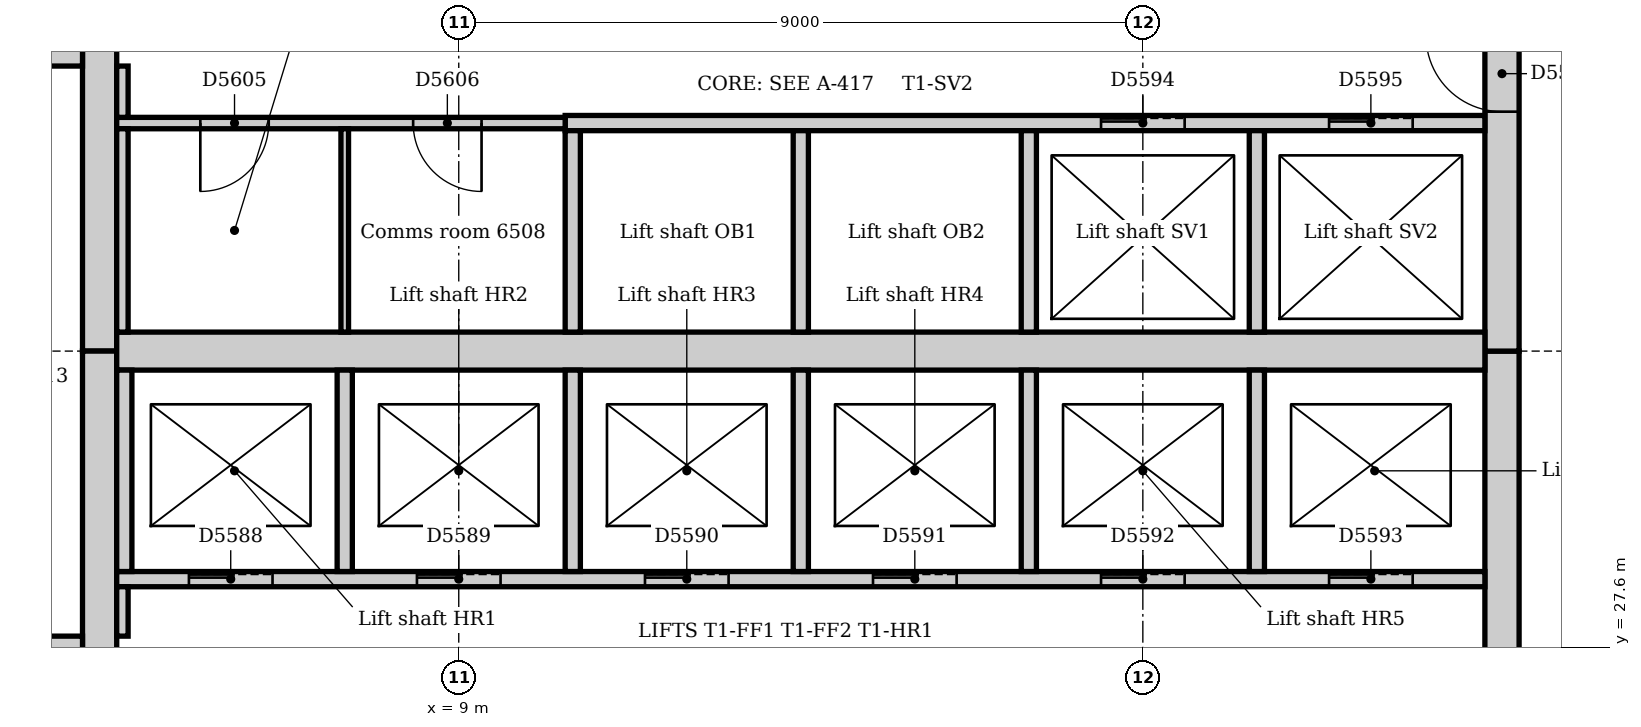
"""IFC4 building model, lengths in metres.
Left out: names, types, materials, properties, quantities, classifications, styles, units other than length and angle.
Written with IfcOpenShell. Run it as: python <this file> out.ifc"""

import sys

from ifc_helpers import new_model, si_unit, direction, frame, frame_2d, origin, place, context, subcontext, project, spatial, rectangle, extrude, element, fill, save


model = new_model("IFC4")
c1 = context("Model", 3, precision=1e-05, world=origin(), true_north=direction((0.0, 1.0)))
c2 = subcontext(c1, "Body", "Model", "MODEL_VIEW")
j1 = project(units=[si_unit("LENGTHUNIT", "METRE"), si_unit("PLANEANGLEUNIT", "RADIAN")], contexts=[c1])
p1 = place(None, origin())
s1 = spatial("IfcSite", under=j1, at=p1, CompositionType="ELEMENT")
p2 = place(p1, origin())
s2 = spatial("IfcBuilding", under=s1, at=p2, CompositionType="ELEMENT")
p3 = place(p2, frame((0.0, 0.0, 271.0)))
s3 = spatial("IfcBuildingStorey", under=s2, at=p3, CompositionType="ELEMENT", Elevation=271.0)
p4 = place(p3, frame((22.725, 21.0, 0.0), z_axis=(0.0, 0.0, 1.0), x_axis=(0.0, 1.0, 0.0)))
e1 = element("IfcWall", 1, at=p4, inside=s3, PredefinedType="SOLIDWALL", context=c2, shape_type="SweptSolid", body=[
    extrude(rectangle(XDim=10.5, YDim=0.45, at=frame_2d((5.25, 0.0))), origin(), (0.0, 0.0, 1.0), 4.0),
])
p5 = place(p4, frame((4.35, 0.0, 0.0)))
e2 = element("IfcOpeningElement", 2, at=p5, cuts=e1, PredefinedType="OPENING", context=c2, shape_type="SweptSolid", body=[
    extrude(rectangle(XDim=1.8, YDim=2.1, at=frame_2d((0.9, 1.05))), frame((0.0, 0.235, 0.0), z_axis=(0.0, -1.0, 0.0), x_axis=(1.0, 0.0, 0.0)), (0.0, 0.0, 1.0), 0.47),
])
p6 = place(p3, frame((22.725, 31.5, 0.0), z_axis=(0.0, 0.0, 1.0), x_axis=(0.0, 1.0, 0.0)))
e3 = element("IfcWall", 3, at=p6, inside=s3, PredefinedType="SOLIDWALL", context=c2, shape_type="SweptSolid", body=[
    extrude(rectangle(XDim=10.5, YDim=0.45, at=frame_2d((5.25, 0.0))), origin(), (0.0, 0.0, 1.0), 4.0),
])
p7 = place(p6, frame((3.15, 0.0, 0.0)))
e4 = element("IfcOpeningElement", 4, at=p7, cuts=e3, PredefinedType="OPENING", context=c2, shape_type="SweptSolid", body=[
    extrude(rectangle(XDim=1.0, YDim=2.1, at=frame_2d((0.5, 1.05))), frame((0.0, 0.235, 0.0), z_axis=(0.0, -1.0, 0.0), x_axis=(1.0, 0.0, 0.0)), (0.0, 0.0, 1.0), 0.47),
])
p8 = place(p6, frame((5.2, 0.0, 0.0)))
e5 = element("IfcOpeningElement", 5, at=p8, cuts=e3, PredefinedType="OPENING", context=c2, shape_type="SweptSolid", body=[
    extrude(rectangle(XDim=1.0, YDim=2.1, at=frame_2d((0.5, 1.05))), frame((0.0, 0.235, 0.0), z_axis=(0.0, -1.0, 0.0), x_axis=(1.0, 0.0, 0.0)), (0.0, 0.0, 1.0), 0.47),
])
p9 = place(p3, frame((4.275, 42.0, 0.0), z_axis=(0.0, 0.0, 1.0), x_axis=(0.0, -1.0, 0.0)))
e6 = element("IfcWall", 6, at=p9, inside=s3, PredefinedType="SOLIDWALL", context=c2, shape_type="SweptSolid", body=[
    extrude(rectangle(XDim=10.5, YDim=0.45, at=frame_2d((5.25, 0.0))), origin(), (0.0, 0.0, 1.0), 4.0),
])
p10 = place(p9, frame((5.3, 0.0, 0.0)))
e7 = element("IfcOpeningElement", 7, at=p10, cuts=e6, PredefinedType="OPENING", context=c2, shape_type="SweptSolid", body=[
    extrude(rectangle(XDim=1.0, YDim=2.1, at=frame_2d((0.5, 1.05))), frame((0.0, 0.235, 0.0), z_axis=(0.0, -1.0, 0.0), x_axis=(1.0, 0.0, 0.0)), (0.0, 0.0, 1.0), 0.47),
])
p11 = place(p3, frame((4.275, 31.5, 0.0), z_axis=(0.0, 0.0, 1.0), x_axis=(0.0, -1.0, 0.0)))
e8 = element("IfcWall", 8, at=p11, inside=s3, PredefinedType="SOLIDWALL", context=c2, shape_type="SweptSolid", body=[
    extrude(rectangle(XDim=10.5, YDim=0.45, at=frame_2d((5.25, 0.0))), origin(), (0.0, 0.0, 1.0), 4.0),
])
p12 = place(p11, frame((4.25, 0.0, 0.0)))
e9 = element("IfcOpeningElement", 9, at=p12, cuts=e8, PredefinedType="OPENING", context=c2, shape_type="SweptSolid", body=[
    extrude(rectangle(XDim=1.0, YDim=2.1, at=frame_2d((0.5, 1.05))), frame((0.0, 0.235, 0.0), z_axis=(0.0, -1.0, 0.0), x_axis=(1.0, 0.0, 0.0)), (0.0, 0.0, 1.0), 0.47),
])
p13 = place(p3, frame((4.5, 31.5, 0.0), z_axis=(0.0, 0.0, 1.0), x_axis=(1.0, 0.0, 0.0)))
e10 = element("IfcWall", 10, at=p13, inside=s3, PredefinedType="SOLIDWALL", context=c2, shape_type="SweptSolid", body=[
    extrude(rectangle(XDim=18.0, YDim=0.5, at=frame_2d((9.0, 0.0))), origin(), (0.0, 0.0, 1.0), 4.0),
])
p14 = place(p3, frame((4.05, 27.625, 0.0), z_axis=(0.0, 0.0, 1.0), x_axis=(-1.0, 0.0, 0.0)))
e11 = element("IfcWall", 11, at=p14, inside=s3, PredefinedType="SOLIDWALL", context=c2, shape_type="SweptSolid", body=[
    extrude(rectangle(XDim=3.69, YDim=0.25, at=frame_2d((1.845, 0.0))), origin(), (0.0, 0.0, 1.0), 4.0),
])
p15 = place(p14, frame((0.55, 0.0, 0.0)))
e12 = element("IfcOpeningElement", 12, at=p15, cuts=e11, PredefinedType="OPENING", context=c2, shape_type="SweptSolid", body=[
    extrude(rectangle(XDim=1.0, YDim=2.1, at=frame_2d((0.5, 1.05))), frame((0.0, 0.135, 0.0), z_axis=(0.0, -1.0, 0.0), x_axis=(1.0, 0.0, 0.0)), (0.0, 0.0, 1.0), 0.27),
])
p16 = place(p3, frame((0.36, 35.375, 0.0), z_axis=(0.0, 0.0, 1.0), x_axis=(1.0, 0.0, 0.0)))
e13 = element("IfcWall", 13, at=p16, inside=s3, PredefinedType="SOLIDWALL", context=c2, shape_type="SweptSolid", body=[
    extrude(rectangle(XDim=3.69, YDim=0.25, at=frame_2d((1.845, 0.0))), origin(), (0.0, 0.0, 1.0), 4.0),
])
p17 = place(p16, frame((2.14, 0.0, 0.0)))
e14 = element("IfcOpeningElement", 14, at=p17, cuts=e13, PredefinedType="OPENING", context=c2, shape_type="SweptSolid", body=[
    extrude(rectangle(XDim=1.0, YDim=2.1, at=frame_2d((0.5, 1.05))), frame((0.0, 0.135, 0.0), z_axis=(0.0, -1.0, 0.0), x_axis=(1.0, 0.0, 0.0)), (0.0, 0.0, 1.0), 0.27),
])
p18 = place(p3, frame((4.5, 28.5, 0.0), z_axis=(0.0, 0.0, 1.0), x_axis=(1.0, 0.0, 0.0)))
e15 = element("IfcWall", 15, at=p18, inside=s3, PredefinedType="PARTITIONING", context=c2, shape_type="SweptSolid", body=[
    extrude(rectangle(XDim=18.0, YDim=0.2, at=frame_2d((9.0, 0.0))), origin(), (0.0, 0.0, 1.0), 3.85),
])
p19 = place(p18, frame((0.95, 0.0, 0.0)))
e16 = element("IfcOpeningElement", 16, at=p19, cuts=e15, PredefinedType="OPENING", context=c2, shape_type="SweptSolid", body=[
    extrude(rectangle(XDim=1.1, YDim=2.1, at=frame_2d((0.55, 1.05))), frame((0.0, 0.11, 0.0), z_axis=(0.0, -1.0, 0.0), x_axis=(1.0, 0.0, 0.0)), (0.0, 0.0, 1.0), 0.22),
])
p20 = place(p18, frame((3.95, 0.0, 0.0)))
e17 = element("IfcOpeningElement", 17, at=p20, cuts=e15, PredefinedType="OPENING", context=c2, shape_type="SweptSolid", body=[
    extrude(rectangle(XDim=1.1, YDim=2.1, at=frame_2d((0.55, 1.05))), frame((0.0, 0.11, 0.0), z_axis=(0.0, -1.0, 0.0), x_axis=(1.0, 0.0, 0.0)), (0.0, 0.0, 1.0), 0.22),
])
p21 = place(p18, frame((6.95, 0.0, 0.0)))
e18 = element("IfcOpeningElement", 18, at=p21, cuts=e15, PredefinedType="OPENING", context=c2, shape_type="SweptSolid", body=[
    extrude(rectangle(XDim=1.1, YDim=2.1, at=frame_2d((0.55, 1.05))), frame((0.0, 0.11, 0.0), z_axis=(0.0, -1.0, 0.0), x_axis=(1.0, 0.0, 0.0)), (0.0, 0.0, 1.0), 0.22),
])
p22 = place(p18, frame((9.95, 0.0, 0.0)))
e19 = element("IfcOpeningElement", 19, at=p22, cuts=e15, PredefinedType="OPENING", context=c2, shape_type="SweptSolid", body=[
    extrude(rectangle(XDim=1.1, YDim=2.1, at=frame_2d((0.55, 1.05))), frame((0.0, 0.11, 0.0), z_axis=(0.0, -1.0, 0.0), x_axis=(1.0, 0.0, 0.0)), (0.0, 0.0, 1.0), 0.22),
])
p23 = place(p18, frame((12.95, 0.0, 0.0)))
e20 = element("IfcOpeningElement", 20, at=p23, cuts=e15, PredefinedType="OPENING", context=c2, shape_type="SweptSolid", body=[
    extrude(rectangle(XDim=1.1, YDim=2.1, at=frame_2d((0.55, 1.05))), frame((0.0, 0.11, 0.0), z_axis=(0.0, -1.0, 0.0), x_axis=(1.0, 0.0, 0.0)), (0.0, 0.0, 1.0), 0.22),
])
p24 = place(p18, frame((15.95, 0.0, 0.0)))
e21 = element("IfcOpeningElement", 21, at=p24, cuts=e15, PredefinedType="OPENING", context=c2, shape_type="SweptSolid", body=[
    extrude(rectangle(XDim=1.1, YDim=2.1, at=frame_2d((0.55, 1.05))), frame((0.0, 0.11, 0.0), z_axis=(0.0, -1.0, 0.0), x_axis=(1.0, 0.0, 0.0)), (0.0, 0.0, 1.0), 0.22),
])
p25 = place(p3, frame((10.4, 34.5, 0.0), z_axis=(0.0, 0.0, 1.0), x_axis=(1.0, 0.0, 0.0)))
e22 = element("IfcWall", 22, at=p25, inside=s3, PredefinedType="PARTITIONING", context=c2, shape_type="SweptSolid", body=[
    extrude(rectangle(XDim=12.1, YDim=0.2, at=frame_2d((6.05, 0.0))), origin(), (0.0, 0.0, 1.0), 3.85),
])
p26 = place(p25, frame((7.05, 0.0, 0.0)))
e23 = element("IfcOpeningElement", 23, at=p26, cuts=e22, PredefinedType="OPENING", context=c2, shape_type="SweptSolid", body=[
    extrude(rectangle(XDim=1.1, YDim=2.1, at=frame_2d((0.55, 1.05))), frame((0.0, 0.11, 0.0), z_axis=(0.0, -1.0, 0.0), x_axis=(1.0, 0.0, 0.0)), (0.0, 0.0, 1.0), 0.22),
])
p27 = place(p25, frame((10.05, 0.0, 0.0)))
e24 = element("IfcOpeningElement", 24, at=p27, cuts=e22, PredefinedType="OPENING", context=c2, shape_type="SweptSolid", body=[
    extrude(rectangle(XDim=1.1, YDim=2.1, at=frame_2d((0.55, 1.05))), frame((0.0, 0.11, 0.0), z_axis=(0.0, -1.0, 0.0), x_axis=(1.0, 0.0, 0.0)), (0.0, 0.0, 1.0), 0.22),
])
for number, where, z_axis, x_axis in (
    (25, (10.5, 28.6, 0.0), (0.0, 0.0, 1.0), (0.0, 1.0, 0.0)),
    (26, (10.5, 31.75, 0.0), (0.0, 0.0, 1.0), (0.0, 1.0, 0.0)),
    (27, (13.5, 28.6, 0.0), (0.0, 0.0, 1.0), (0.0, 1.0, 0.0)),
    (28, (13.5, 31.75, 0.0), (0.0, 0.0, 1.0), (0.0, 1.0, 0.0)),
    (29, (16.5, 28.6, 0.0), (0.0, 0.0, 1.0), (0.0, 1.0, 0.0)),
    (30, (16.5, 31.75, 0.0), (0.0, 0.0, 1.0), (0.0, 1.0, 0.0)),
    (31, (19.5, 28.6, 0.0), (0.0, 0.0, 1.0), (0.0, 1.0, 0.0)),
    (32, (19.5, 31.75, 0.0), (0.0, 0.0, 1.0), (0.0, 1.0, 0.0)),
    (33, (4.6, 28.6, 0.0), (0.0, 0.0, 1.0), (0.0, 1.0, 0.0)),
    (34, (7.5, 28.6, 0.0), (0.0, 0.0, 1.0), (0.0, 1.0, 0.0)),
):
    element("IfcWall", number, at=place(p3, frame(where, z_axis=z_axis, x_axis=x_axis)), inside=s3, PredefinedType="PARTITIONING", context=c2, shape_type="SweptSolid", body=[
        extrude(rectangle(XDim=2.65, YDim=0.2, at=frame_2d((1.325, 0.0))), origin(), (0.0, 0.0, 1.0), 3.85),
    ])
p28 = place(p3, frame((4.5, 34.5, 0.0), z_axis=(0.0, 0.0, 1.0), x_axis=(1.0, 0.0, 0.0)))
e35 = element("IfcWall", 35, at=p28, inside=s3, PredefinedType="PARTITIONING", context=c2, shape_type="SweptSolid", body=[
    extrude(rectangle(XDim=5.9, YDim=0.15, at=frame_2d((2.95, 0.0))), origin(), (0.0, 0.0, 1.0), 3.85),
])
p29 = place(p28, frame((1.1, 0.0, 0.0)))
e36 = element("IfcOpeningElement", 36, at=p29, cuts=e35, PredefinedType="OPENING", context=c2, shape_type="SweptSolid", body=[
    extrude(rectangle(XDim=0.9, YDim=2.1, at=frame_2d((0.45, 1.05))), frame((0.0, 0.085, 0.0), z_axis=(0.0, -1.0, 0.0), x_axis=(1.0, 0.0, 0.0)), (0.0, 0.0, 1.0), 0.17),
])
p30 = place(p28, frame((3.9, 0.0, 0.0)))
e37 = element("IfcOpeningElement", 37, at=p30, cuts=e35, PredefinedType="OPENING", context=c2, shape_type="SweptSolid", body=[
    extrude(rectangle(XDim=0.9, YDim=2.1, at=frame_2d((0.45, 1.05))), frame((0.0, 0.085, 0.0), z_axis=(0.0, -1.0, 0.0), x_axis=(1.0, 0.0, 0.0)), (0.0, 0.0, 1.0), 0.17),
])
p31 = place(p3, frame((4.575, 34.575, 0.0), z_axis=(0.0, 0.0, 1.0), x_axis=(0.0, 1.0, 0.0)))
e38 = element("IfcWall", 38, at=p31, inside=s3, PredefinedType="PARTITIONING", context=c2, shape_type="SweptSolid", body=[
    extrude(rectangle(XDim=0.675, YDim=0.15, at=frame_2d((0.338, 0.0))), origin(), (0.0, 0.0, 1.0), 3.85),
])
p32 = place(p3, frame((4.575, 31.75, 0.0), z_axis=(0.0, 0.0, 1.0), x_axis=(0.0, 1.0, 0.0)))
e39 = element("IfcWall", 39, at=p32, inside=s3, PredefinedType="PARTITIONING", context=c2, shape_type="SweptSolid", body=[
    extrude(rectangle(XDim=2.675, YDim=0.15, at=frame_2d((1.337, 0.0))), origin(), (0.0, 0.0, 1.0), 3.85),
])
p33 = place(p3, frame((4.575, 27.75, 0.0), z_axis=(0.0, 0.0, 1.0), x_axis=(0.0, 1.0, 0.0)))
e40 = element("IfcWall", 40, at=p33, inside=s3, PredefinedType="PARTITIONING", context=c2, shape_type="SweptSolid", body=[
    extrude(rectangle(XDim=0.65, YDim=0.15, at=frame_2d((0.325, 0.0))), origin(), (0.0, 0.0, 1.0), 3.85),
])
p34 = place(p3, frame((7.5, 31.75, 0.0), z_axis=(0.0, 0.0, 1.0), x_axis=(0.0, 1.0, 0.0)))
e41 = element("IfcWall", 41, at=p34, inside=s3, PredefinedType="PARTITIONING", context=c2, shape_type="SweptSolid", body=[
    extrude(rectangle(XDim=2.675, YDim=0.1, at=frame_2d((1.337, 0.0))), origin(), (0.0, 0.0, 1.0), 3.85),
])
p35 = place(p19, origin())
e42 = element("IfcDoor", 42, at=p35, inside=s3, OperationType="SLIDING_TO_LEFT", PredefinedType="DOOR", context=c2, shape_type="SweptSolid", body=[
    extrude(rectangle(XDim=1.1, YDim=2.1, at=frame_2d((0.55, 1.05))), frame((0.0, 0.025, 0.0), z_axis=(0.0, -1.0, 0.0), x_axis=(1.0, 0.0, 0.0)), (0.0, 0.0, 1.0), 0.05),
])
fill(e16, e42)
p36 = place(p20, origin())
e43 = element("IfcDoor", 43, at=p36, inside=s3, OperationType="SLIDING_TO_LEFT", PredefinedType="DOOR", context=c2, shape_type="SweptSolid", body=[
    extrude(rectangle(XDim=1.1, YDim=2.1, at=frame_2d((0.55, 1.05))), frame((0.0, 0.025, 0.0), z_axis=(0.0, -1.0, 0.0), x_axis=(1.0, 0.0, 0.0)), (0.0, 0.0, 1.0), 0.05),
])
fill(e17, e43)
p37 = place(p21, origin())
e44 = element("IfcDoor", 44, at=p37, inside=s3, OperationType="SLIDING_TO_LEFT", PredefinedType="DOOR", context=c2, shape_type="SweptSolid", body=[
    extrude(rectangle(XDim=1.1, YDim=2.1, at=frame_2d((0.55, 1.05))), frame((0.0, 0.025, 0.0), z_axis=(0.0, -1.0, 0.0), x_axis=(1.0, 0.0, 0.0)), (0.0, 0.0, 1.0), 0.05),
])
fill(e18, e44)
p38 = place(p22, origin())
e45 = element("IfcDoor", 45, at=p38, inside=s3, OperationType="SLIDING_TO_LEFT", PredefinedType="DOOR", context=c2, shape_type="SweptSolid", body=[
    extrude(rectangle(XDim=1.1, YDim=2.1, at=frame_2d((0.55, 1.05))), frame((0.0, 0.025, 0.0), z_axis=(0.0, -1.0, 0.0), x_axis=(1.0, 0.0, 0.0)), (0.0, 0.0, 1.0), 0.05),
])
fill(e19, e45)
p39 = place(p23, origin())
e46 = element("IfcDoor", 46, at=p39, inside=s3, OperationType="SLIDING_TO_LEFT", PredefinedType="DOOR", context=c2, shape_type="SweptSolid", body=[
    extrude(rectangle(XDim=1.1, YDim=2.1, at=frame_2d((0.55, 1.05))), frame((0.0, 0.025, 0.0), z_axis=(0.0, -1.0, 0.0), x_axis=(1.0, 0.0, 0.0)), (0.0, 0.0, 1.0), 0.05),
])
fill(e20, e46)
p40 = place(p24, origin())
e47 = element("IfcDoor", 47, at=p40, inside=s3, OperationType="SLIDING_TO_LEFT", PredefinedType="DOOR", context=c2, shape_type="SweptSolid", body=[
    extrude(rectangle(XDim=1.1, YDim=2.1, at=frame_2d((0.55, 1.05))), frame((0.0, 0.025, 0.0), z_axis=(0.0, -1.0, 0.0), x_axis=(1.0, 0.0, 0.0)), (0.0, 0.0, 1.0), 0.05),
])
fill(e21, e47)
p41 = place(p26, origin())
e48 = element("IfcDoor", 48, at=p41, inside=s3, OperationType="SLIDING_TO_LEFT", PredefinedType="DOOR", context=c2, shape_type="SweptSolid", body=[
    extrude(rectangle(XDim=1.1, YDim=2.1, at=frame_2d((0.55, 1.05))), frame((0.0, 0.025, 0.0), z_axis=(0.0, -1.0, 0.0), x_axis=(1.0, 0.0, 0.0)), (0.0, 0.0, 1.0), 0.05),
])
fill(e23, e48)
p42 = place(p27, origin())
e49 = element("IfcDoor", 49, at=p42, inside=s3, OperationType="SLIDING_TO_LEFT", PredefinedType="DOOR", context=c2, shape_type="SweptSolid", body=[
    extrude(rectangle(XDim=1.1, YDim=2.1, at=frame_2d((0.55, 1.05))), frame((0.0, 0.025, 0.0), z_axis=(0.0, -1.0, 0.0), x_axis=(1.0, 0.0, 0.0)), (0.0, 0.0, 1.0), 0.05),
])
fill(e24, e49)
p43 = place(p7, origin())
e50 = element("IfcDoor", 50, at=p43, inside=s3, OperationType="SINGLE_SWING_RIGHT", PredefinedType="DOOR", context=c2, shape_type="SweptSolid", body=[
    extrude(rectangle(XDim=1.0, YDim=2.1, at=frame_2d((0.5, 1.05))), frame((0.0, 0.025, 0.0), z_axis=(0.0, -1.0, 0.0), x_axis=(1.0, 0.0, 0.0)), (0.0, 0.0, 1.0), 0.05),
])
fill(e4, e50)
p44 = place(p29, frame((0.9, 0.0, 0.0), z_axis=(0.0, 0.0, 1.0), x_axis=(-1.0, 0.0, 0.0)))
e51 = element("IfcDoor", 51, at=p44, inside=s3, OperationType="SINGLE_SWING_RIGHT", PredefinedType="DOOR", context=c2, shape_type="SweptSolid", body=[
    extrude(rectangle(XDim=0.9, YDim=2.1, at=frame_2d((0.45, 1.05))), frame((0.0, 0.025, 0.0), z_axis=(0.0, -1.0, 0.0), x_axis=(1.0, 0.0, 0.0)), (0.0, 0.0, 1.0), 0.05),
])
fill(e36, e51)
p45 = place(p30, frame((0.9, 0.0, 0.0), z_axis=(0.0, 0.0, 1.0), x_axis=(-1.0, 0.0, 0.0)))
e52 = element("IfcDoor", 52, at=p45, inside=s3, OperationType="SINGLE_SWING_LEFT", PredefinedType="DOOR", context=c2, shape_type="SweptSolid", body=[
    extrude(rectangle(XDim=0.9, YDim=2.1, at=frame_2d((0.45, 1.05))), frame((0.0, 0.025, 0.0), z_axis=(0.0, -1.0, 0.0), x_axis=(1.0, 0.0, 0.0)), (0.0, 0.0, 1.0), 0.05),
])
fill(e37, e52)
save(model, sys.argv[1])
